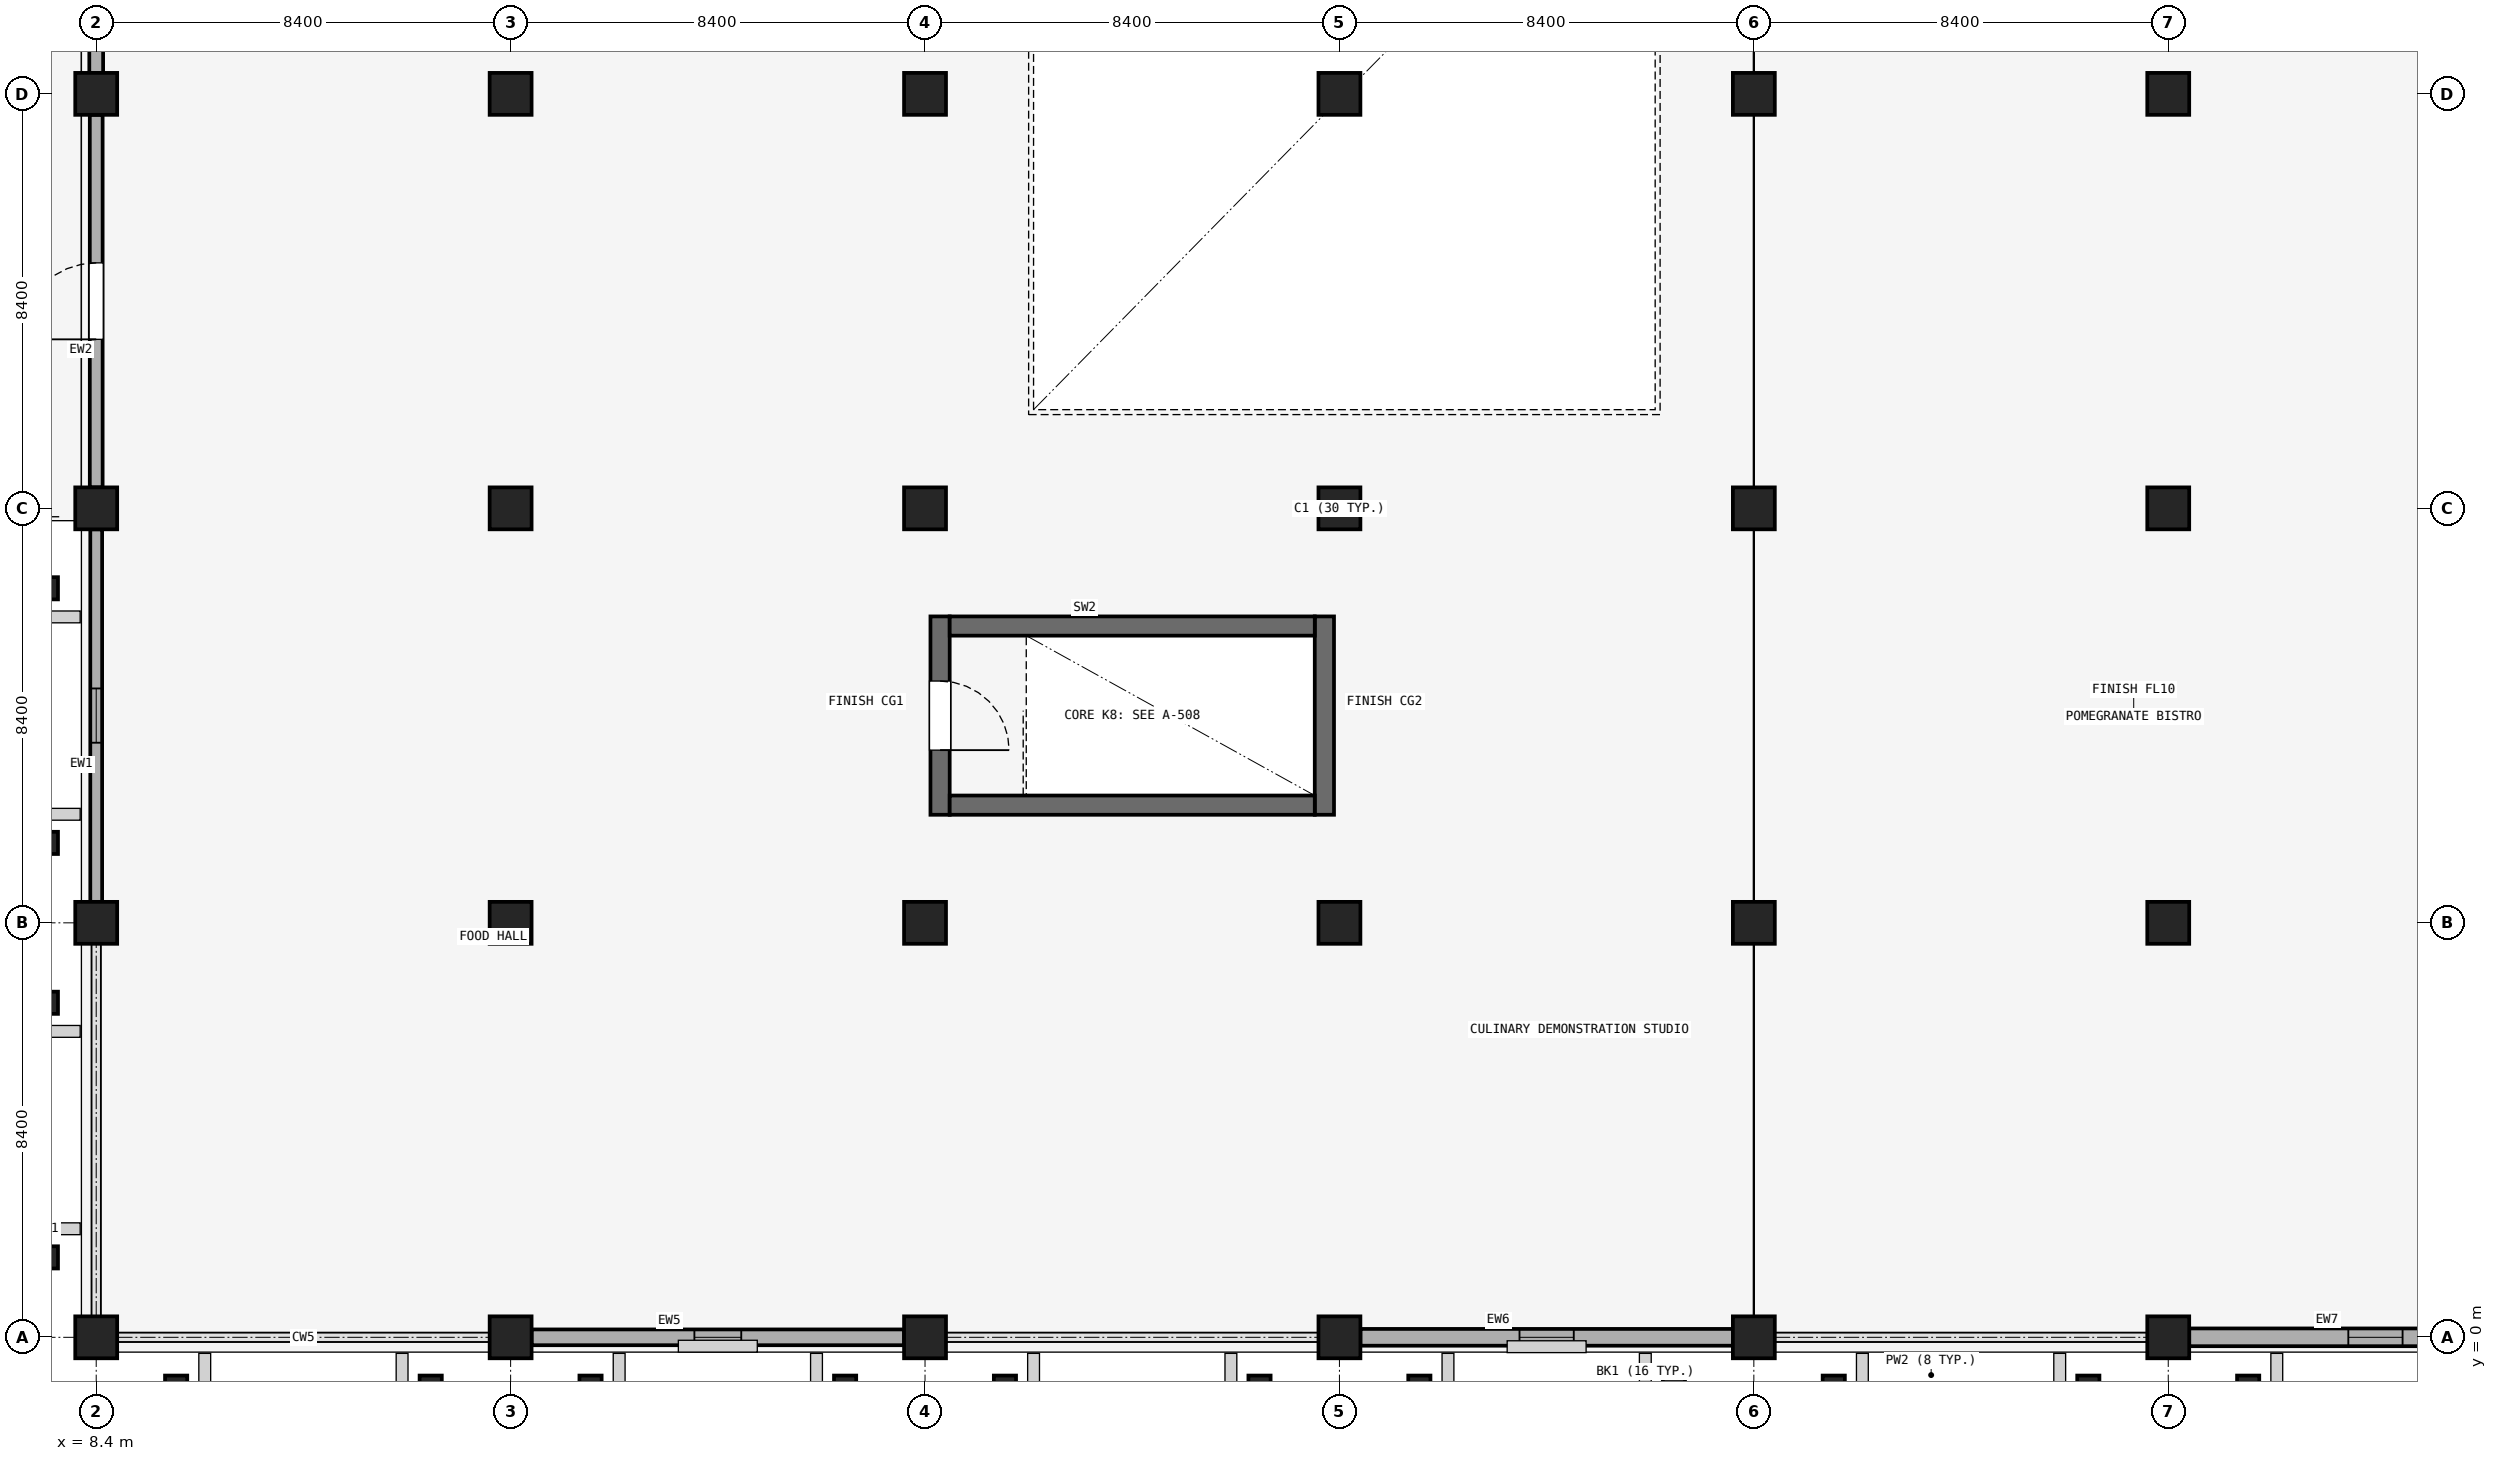
"""IFC4 building model, lengths in metres.
Left out: names, types, materials, properties, quantities, classifications, styles, units other than length and angle.
Written with IfcOpenShell. Run it as: python <this file> out.ifc"""

import sys

from ifc_helpers import new_model, si_unit, direction, frame, frame_2d, origin, origin_2d, place, context, subcontext, project, spatial, rectangle, extrude, element, fill, save


model = new_model("IFC4")
c1 = context("Model", 3, precision=1e-05, world=origin(), true_north=direction((0.0, 1.0)))
c2 = subcontext(c1, "Body", "Model", "MODEL_VIEW")
j1 = project(units=[si_unit("LENGTHUNIT", "METRE"), si_unit("PLANEANGLEUNIT", "RADIAN")], contexts=[c1])
p1 = place(None, origin())
s1 = spatial("IfcSite", under=j1, at=p1, CompositionType="ELEMENT")
p2 = place(p1, origin())
s2 = spatial("IfcBuilding", under=s1, at=p2, CompositionType="ELEMENT")
p3 = place(p2, frame((0.0, 0.0, 9.9)))
s3 = spatial("IfcBuildingStorey", under=s2, at=p3, CompositionType="ELEMENT", Elevation=9.9)
for number, where, z_axis, x_axis in (
    (1, (8.4, 0.0, 0.0), (0.0, 0.0, 1.0), (1.0, 0.0, 0.0)),
    (2, (16.8, 0.0, 0.0), (0.0, 0.0, 1.0), (1.0, 0.0, 0.0)),
    (3, (25.2, 0.0, 0.0), (0.0, 0.0, 1.0), (1.0, 0.0, 0.0)),
    (4, (33.6, 0.0, 0.0), (0.0, 0.0, 1.0), (1.0, 0.0, 0.0)),
    (5, (42.0, 0.0, 0.0), (0.0, 0.0, 1.0), (1.0, 0.0, 0.0)),
    (6, (50.4, 0.0, 0.0), (0.0, 0.0, 1.0), (1.0, 0.0, 0.0)),
    (7, (8.4, 8.4, 0.0), (0.0, 0.0, 1.0), (1.0, 0.0, 0.0)),
    (8, (16.8, 8.4, 0.0), (0.0, 0.0, 1.0), (1.0, 0.0, 0.0)),
    (9, (25.2, 8.4, 0.0), (0.0, 0.0, 1.0), (1.0, 0.0, 0.0)),
    (10, (33.6, 8.4, 0.0), (0.0, 0.0, 1.0), (1.0, 0.0, 0.0)),
    (11, (42.0, 8.4, 0.0), (0.0, 0.0, 1.0), (1.0, 0.0, 0.0)),
    (12, (50.4, 8.4, 0.0), (0.0, 0.0, 1.0), (1.0, 0.0, 0.0)),
    (13, (8.4, 16.8, 0.0), (0.0, 0.0, 1.0), (1.0, 0.0, 0.0)),
    (14, (16.8, 16.8, 0.0), (0.0, 0.0, 1.0), (1.0, 0.0, 0.0)),
    (15, (25.2, 16.8, 0.0), (0.0, 0.0, 1.0), (1.0, 0.0, 0.0)),
    (16, (33.6, 16.8, 0.0), (0.0, 0.0, 1.0), (1.0, 0.0, 0.0)),
    (17, (42.0, 16.8, 0.0), (0.0, 0.0, 1.0), (1.0, 0.0, 0.0)),
    (18, (50.4, 16.8, 0.0), (0.0, 0.0, 1.0), (1.0, 0.0, 0.0)),
    (19, (8.4, 25.2, 0.0), (0.0, 0.0, 1.0), (1.0, 0.0, 0.0)),
    (20, (16.8, 25.2, 0.0), (0.0, 0.0, 1.0), (1.0, 0.0, 0.0)),
    (21, (25.2, 25.2, 0.0), (0.0, 0.0, 1.0), (1.0, 0.0, 0.0)),
    (22, (33.6, 25.2, 0.0), (0.0, 0.0, 1.0), (1.0, 0.0, 0.0)),
    (23, (42.0, 25.2, 0.0), (0.0, 0.0, 1.0), (1.0, 0.0, 0.0)),
    (24, (50.4, 25.2, 0.0), (0.0, 0.0, 1.0), (1.0, 0.0, 0.0)),
):
    element("IfcColumn", number, at=place(p3, frame(where, z_axis=z_axis, x_axis=x_axis)), inside=s3, PredefinedType="COLUMN", context=c2, shape_type="SweptSolid", body=[
        extrude(rectangle(XDim=0.85, YDim=0.85, at=origin_2d()), origin(), (0.0, 0.0, 1.0), 4.5),
    ])
for number, where, z_axis, x_axis in (
    (25, (10.02, -1.05, 0.0), (0.0, 0.0, 1.0), (1.0, 0.0, 0.0)),
    (26, (15.18, -1.05, 0.0), (0.0, 0.0, 1.0), (1.0, 0.0, 0.0)),
    (27, (18.42, -1.05, 0.0), (0.0, 0.0, 1.0), (1.0, 0.0, 0.0)),
    (28, (23.58, -1.05, 0.0), (0.0, 0.0, 1.0), (1.0, 0.0, 0.0)),
    (29, (26.82, -1.05, 0.0), (0.0, 0.0, 1.0), (1.0, 0.0, 0.0)),
    (30, (31.98, -1.05, 0.0), (0.0, 0.0, 1.0), (1.0, 0.0, 0.0)),
    (31, (35.22, -1.05, 0.0), (0.0, 0.0, 1.0), (1.0, 0.0, 0.0)),
    (32, (40.38, -1.05, 0.0), (0.0, 0.0, 1.0), (1.0, 0.0, 0.0)),
    (33, (43.62, -1.05, 0.0), (0.0, 0.0, 1.0), (1.0, 0.0, 0.0)),
    (34, (48.78, -1.05, 0.0), (0.0, 0.0, 1.0), (1.0, 0.0, 0.0)),
    (35, (52.02, -1.05, 0.0), (0.0, 0.0, 1.0), (1.0, 0.0, 0.0)),
    (36, (7.35, 1.62, 0.0), (0.0, 0.0, 1.0), (0.0, 1.0, 0.0)),
    (37, (7.35, 6.78, 0.0), (0.0, 0.0, 1.0), (0.0, 1.0, 0.0)),
    (38, (7.35, 10.02, 0.0), (0.0, 0.0, 1.0), (0.0, 1.0, 0.0)),
    (39, (7.35, 15.18, 0.0), (0.0, 0.0, 1.0), (0.0, 1.0, 0.0)),
):
    element("IfcColumn", number, at=place(p3, frame(where, z_axis=z_axis, x_axis=x_axis)), inside=s3, PredefinedType="PILASTER", context=c2, shape_type="SweptSolid", body=[
        extrude(rectangle(XDim=0.45, YDim=0.55, at=origin_2d()), origin(), (0.0, 0.0, 1.0), 4.5),
    ])
p4 = place(p3, frame((17.225, 0.0, 0.0), z_axis=(0.0, 0.0, 1.0), x_axis=(1.0, 0.0, 0.0)))
e40 = element("IfcWall", 40, at=p4, inside=s3, PredefinedType="SOLIDWALL", context=c2, shape_type="SweptSolid", body=[
    extrude(rectangle(XDim=7.55, YDim=0.32, at=frame_2d((3.775, 0.0))), origin(), (0.0, 0.0, 1.0), 3.49),
])
p5 = place(p4, frame((3.3, 0.0, 0.95)))
e41 = element("IfcOpeningElement", 41, at=p5, cuts=e40, PredefinedType="OPENING", context=c2, shape_type="SweptSolid", body=[
    extrude(rectangle(XDim=0.95, YDim=2.1, at=frame_2d((0.475, 1.05))), frame((0.0, 0.17, 0.0), z_axis=(0.0, -1.0, 0.0), x_axis=(1.0, 0.0, 0.0)), (0.0, 0.0, 1.0), 0.34),
])
p6 = place(p3, frame((34.025, 0.0, 0.0), z_axis=(0.0, 0.0, 1.0), x_axis=(1.0, 0.0, 0.0)))
e42 = element("IfcWall", 42, at=p6, inside=s3, PredefinedType="SOLIDWALL", context=c2, shape_type="SweptSolid", body=[
    extrude(rectangle(XDim=7.55, YDim=0.34, at=frame_2d((3.775, 0.0))), origin(), (0.0, 0.0, 1.0), 3.49),
])
p7 = place(p6, frame((3.225, 0.0, 0.95)))
e43 = element("IfcOpeningElement", 43, at=p7, cuts=e42, PredefinedType="OPENING", context=c2, shape_type="SweptSolid", body=[
    extrude(rectangle(XDim=1.1, YDim=1.35, at=frame_2d((0.55, 0.675))), frame((0.0, 0.18, 0.0), z_axis=(0.0, -1.0, 0.0), x_axis=(1.0, 0.0, 0.0)), (0.0, 0.0, 1.0), 0.36),
])
p8 = place(p3, frame((50.825, 0.0, 0.0), z_axis=(0.0, 0.0, 1.0), x_axis=(1.0, 0.0, 0.0)))
e44 = element("IfcWall", 44, at=p8, inside=s3, PredefinedType="SOLIDWALL", context=c2, shape_type="SweptSolid", body=[
    extrude(rectangle(XDim=7.55, YDim=0.36, at=frame_2d((3.775, 0.0))), origin(), (0.0, 0.0, 1.0), 3.49),
])
p9 = place(p8, frame((3.225, 0.0, 0.95)))
e45 = element("IfcOpeningElement", 45, at=p9, cuts=e44, PredefinedType="OPENING", context=c2, shape_type="SweptSolid", body=[
    extrude(rectangle(XDim=1.1, YDim=1.6, at=frame_2d((0.55, 0.8))), frame((0.0, 0.19, 0.0), z_axis=(0.0, -1.0, 0.0), x_axis=(1.0, 0.0, 0.0)), (0.0, 0.0, 1.0), 0.38),
])
p10 = place(p3, frame((8.4, 8.825, 0.0), z_axis=(0.0, 0.0, 1.0), x_axis=(0.0, 1.0, 0.0)))
e46 = element("IfcWall", 46, at=p10, inside=s3, PredefinedType="SOLIDWALL", context=c2, shape_type="SweptSolid", body=[
    extrude(rectangle(XDim=7.55, YDim=0.24, at=frame_2d((3.775, 0.0))), origin(), (0.0, 0.0, 1.0), 3.49),
])
p11 = place(p10, frame((3.225, 0.0, 0.95)))
e47 = element("IfcOpeningElement", 47, at=p11, cuts=e46, PredefinedType="OPENING", context=c2, shape_type="SweptSolid", body=[
    extrude(rectangle(XDim=1.1, YDim=1.85, at=frame_2d((0.55, 0.925))), frame((0.0, 0.13, 0.0), z_axis=(0.0, -1.0, 0.0), x_axis=(1.0, 0.0, 0.0)), (0.0, 0.0, 1.0), 0.26),
])
p12 = place(p3, frame((8.4, 17.225, 0.0), z_axis=(0.0, 0.0, 1.0), x_axis=(0.0, 1.0, 0.0)))
e48 = element("IfcWall", 48, at=p12, inside=s3, PredefinedType="SOLIDWALL", context=c2, shape_type="SweptSolid", body=[
    extrude(rectangle(XDim=7.55, YDim=0.26, at=frame_2d((3.775, 0.0))), origin(), (0.0, 0.0, 1.0), 3.49),
])
p13 = place(p12, frame((3.0, 0.0, 0.0)))
e49 = element("IfcOpeningElement", 49, at=p13, cuts=e48, PredefinedType="OPENING", context=c2, shape_type="SweptSolid", body=[
    extrude(rectangle(XDim=1.55, YDim=2.25, at=frame_2d((0.775, 1.125))), frame((0.0, 0.14, 0.0), z_axis=(0.0, -1.0, 0.0), x_axis=(1.0, 0.0, 0.0)), (0.0, 0.0, 1.0), 0.28),
])
p14 = place(p3, frame((8.4, 25.625, 0.0), z_axis=(0.0, 0.0, 1.0), x_axis=(0.0, 1.0, 0.0)))
e50 = element("IfcWall", 50, at=p14, inside=s3, PredefinedType="SOLIDWALL", context=c2, shape_type="SweptSolid", body=[
    extrude(rectangle(XDim=7.55, YDim=0.28, at=frame_2d((3.775, 0.0))), origin(), (0.0, 0.0, 1.0), 3.49),
])
p15 = place(p14, frame((3.15, 0.0, 0.0)))
e51 = element("IfcOpeningElement", 51, at=p15, cuts=e50, PredefinedType="OPENING", context=c2, shape_type="SweptSolid", body=[
    extrude(rectangle(XDim=1.25, YDim=2.2, at=frame_2d((0.625, 1.1))), frame((0.0, 0.15, 0.0), z_axis=(0.0, -1.0, 0.0), x_axis=(1.0, 0.0, 0.0)), (0.0, 0.0, 1.0), 0.3),
])
p16 = place(p3, frame((25.505, 14.61, 0.0), z_axis=(0.0, 0.0, 1.0), x_axis=(0.0, -1.0, 0.0)))
e52 = element("IfcWall", 52, at=p16, inside=s3, PredefinedType="SHEAR", context=c2, shape_type="SweptSolid", body=[
    extrude(rectangle(XDim=4.02, YDim=0.39, at=frame_2d((2.01, 0.0))), origin(), (0.0, 0.0, 1.0), 4.24),
])
p17 = place(p16, frame((1.31, 0.0, 0.0)))
e53 = element("IfcOpeningElement", 53, at=p17, cuts=e52, PredefinedType="OPENING", context=c2, shape_type="SweptSolid", body=[
    extrude(rectangle(XDim=1.4, YDim=2.15, at=frame_2d((0.7, 1.075))), frame((0.0, 0.205, 0.0), z_axis=(0.0, -1.0, 0.0), x_axis=(1.0, 0.0, 0.0)), (0.0, 0.0, 1.0), 0.41),
])
p18 = place(p3, frame((33.295, 10.59, 0.0), z_axis=(0.0, 0.0, 1.0), x_axis=(0.0, 1.0, 0.0)))
e54 = element("IfcWall", 54, at=p18, inside=s3, PredefinedType="SHEAR", context=c2, shape_type="SweptSolid", body=[
    extrude(rectangle(XDim=4.02, YDim=0.39, at=frame_2d((2.01, 0.0))), origin(), (0.0, 0.0, 1.0), 4.24),
])
for number, where, z_axis, x_axis in (
    (55, (25.7, 10.785, 0.0), (0.0, 0.0, 1.0), (1.0, 0.0, 0.0)),
    (56, (25.7, 14.415, 0.0), (0.0, 0.0, 1.0), (1.0, 0.0, 0.0)),
):
    element("IfcWall", number, at=place(p3, frame(where, z_axis=z_axis, x_axis=x_axis)), inside=s3, PredefinedType="SHEAR", context=c2, shape_type="SweptSolid", body=[
        extrude(rectangle(XDim=7.4, YDim=0.39, at=frame_2d((3.7, 0.0))), origin(), (0.0, 0.0, 1.0), 4.24),
    ])
p19 = place(p5, origin())
e57 = element("IfcWindow", 57, at=p19, inside=s3, PartitioningType="SINGLE_PANEL", PredefinedType="WINDOW", context=c2, shape_type="SweptSolid", body=[
    extrude(rectangle(XDim=0.95, YDim=2.1, at=frame_2d((0.475, 1.05))), frame((0.0, 0.03, 0.0), z_axis=(0.0, -1.0, 0.0), x_axis=(1.0, 0.0, 0.0)), (0.0, 0.0, 1.0), 0.06),
])
fill(e41, e57)
p20 = place(p7, origin())
e58 = element("IfcWindow", 58, at=p20, inside=s3, PartitioningType="SINGLE_PANEL", PredefinedType="WINDOW", context=c2, shape_type="SweptSolid", body=[
    extrude(rectangle(XDim=1.1, YDim=1.35, at=frame_2d((0.55, 0.675))), frame((0.0, 0.03, 0.0), z_axis=(0.0, -1.0, 0.0), x_axis=(1.0, 0.0, 0.0)), (0.0, 0.0, 1.0), 0.06),
])
fill(e43, e58)
p21 = place(p9, origin())
e59 = element("IfcWindow", 59, at=p21, inside=s3, PartitioningType="SINGLE_PANEL", PredefinedType="WINDOW", context=c2, shape_type="SweptSolid", body=[
    extrude(rectangle(XDim=1.1, YDim=1.6, at=frame_2d((0.55, 0.8))), frame((0.0, 0.03, 0.0), z_axis=(0.0, -1.0, 0.0), x_axis=(1.0, 0.0, 0.0)), (0.0, 0.0, 1.0), 0.06),
])
fill(e45, e59)
p22 = place(p11, origin())
e60 = element("IfcWindow", 60, at=p22, inside=s3, PartitioningType="SINGLE_PANEL", PredefinedType="WINDOW", context=c2, shape_type="SweptSolid", body=[
    extrude(rectangle(XDim=1.1, YDim=1.85, at=frame_2d((0.55, 0.925))), frame((0.0, 0.03, 0.0), z_axis=(0.0, -1.0, 0.0), x_axis=(1.0, 0.0, 0.0)), (0.0, 0.0, 1.0), 0.06),
])
fill(e47, e60)
p23 = place(p13, origin())
e61 = element("IfcDoor", 61, at=p23, inside=s3, OperationType="SINGLE_SWING_LEFT", PredefinedType="DOOR", context=c2, shape_type="SweptSolid", body=[
    extrude(rectangle(XDim=1.55, YDim=2.25, at=frame_2d((0.775, 1.125))), frame((0.0, 0.025, 0.0), z_axis=(0.0, -1.0, 0.0), x_axis=(1.0, 0.0, 0.0)), (0.0, 0.0, 1.0), 0.05),
])
fill(e49, e61)
p24 = place(p17, origin())
e62 = element("IfcDoor", 62, at=p24, inside=s3, OperationType="SINGLE_SWING_RIGHT", PredefinedType="DOOR", context=c2, shape_type="SweptSolid", body=[
    extrude(rectangle(XDim=1.4, YDim=2.15, at=frame_2d((0.7, 1.075))), frame((0.0, 0.025, 0.0), z_axis=(0.0, -1.0, 0.0), x_axis=(1.0, 0.0, 0.0)), (0.0, 0.0, 1.0), 0.05),
])
fill(e53, e62)
save(model, sys.argv[1])
